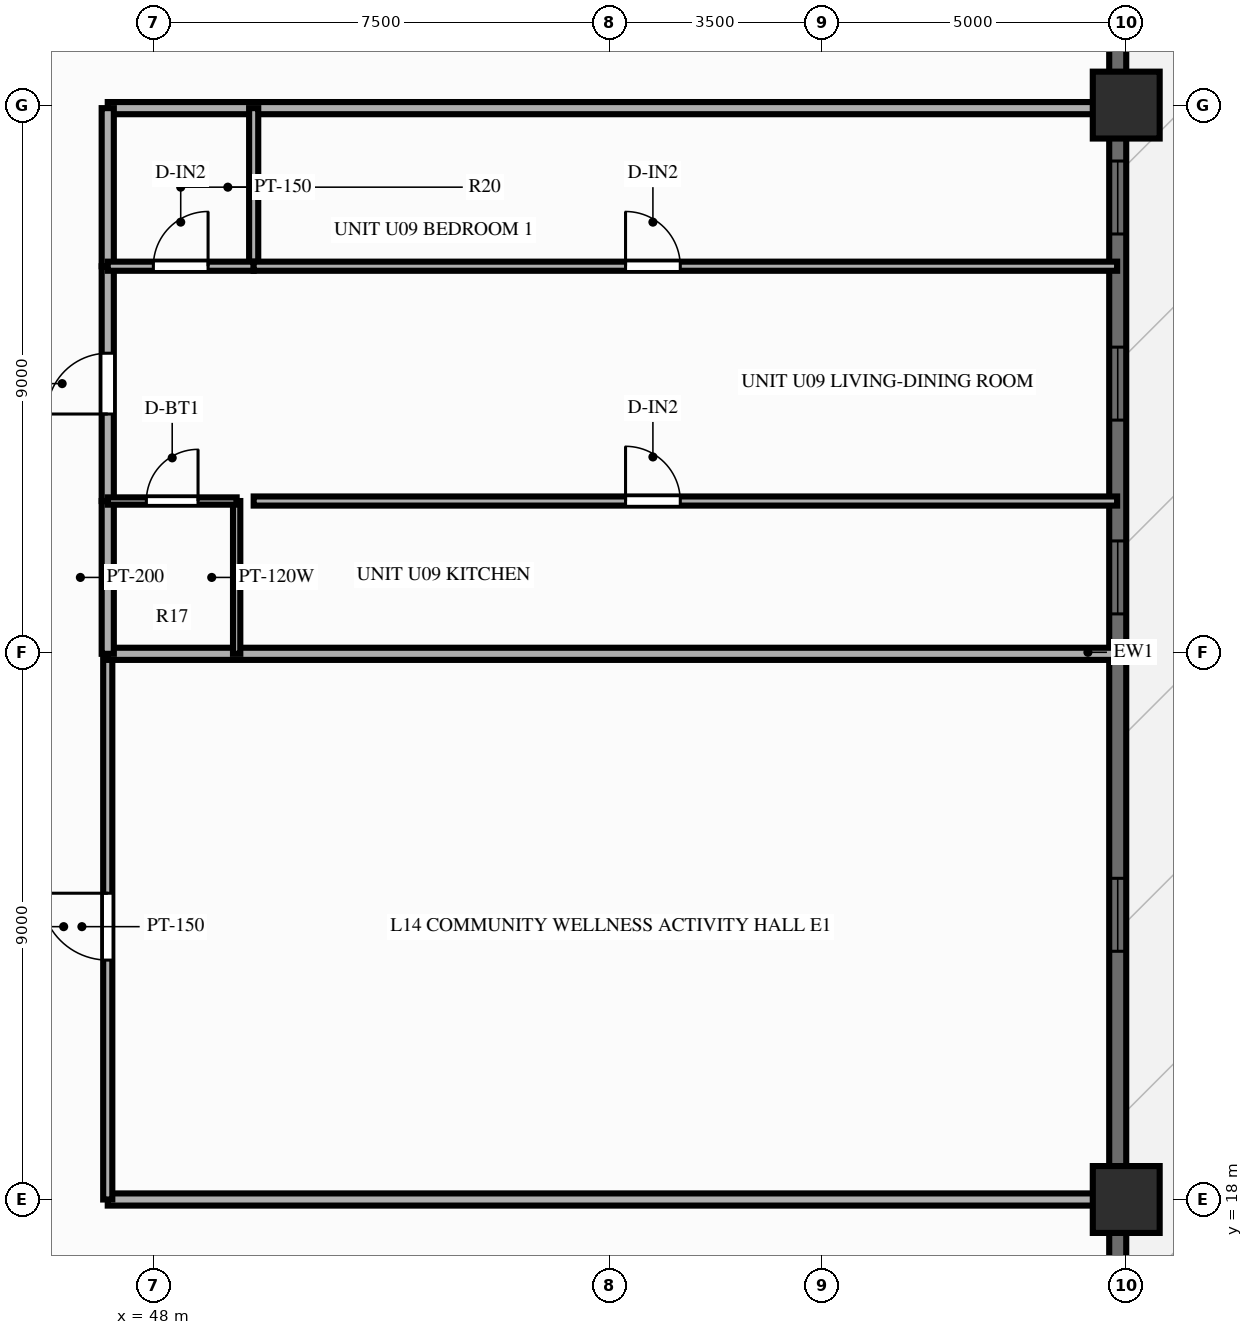
"""IFC4 building model, lengths in metres.
Left out: names, types, materials, properties, quantities, classifications, styles, units other than length and angle.
Written with IfcOpenShell. Run it as: python <this file> out.ifc"""

import sys

from ifc_helpers import new_model, si_unit, direction, frame, frame_2d, origin, origin_2d, place, context, subcontext, project, spatial, rectangle, extrude, source, transform, mapped, element, fill, save


model = new_model("IFC4")
c1 = context("Model", 3, precision=1e-05, world=origin(), true_north=direction((0.0, 1.0)))
c2 = subcontext(c1, "Body", "Model", "MODEL_VIEW")
j1 = project(units=[si_unit("LENGTHUNIT", "METRE"), si_unit("PLANEANGLEUNIT", "RADIAN")], contexts=[c1])
p1 = place(None, origin())
s1 = spatial("IfcSite", under=j1, at=p1, CompositionType="ELEMENT")
p2 = place(p1, origin())
s2 = spatial("IfcBuilding", under=s1, at=p2, CompositionType="ELEMENT")
p3 = place(p2, frame((0.0, 0.0, 46.4)))
s3 = spatial("IfcBuildingStorey", under=s2, at=p3, CompositionType="ELEMENT", Elevation=46.4)
m1 = source(origin(), c2, "Body", "SweptSolid", [
    extrude(rectangle(XDim=1.1, YDim=1.1, at=origin_2d()), origin(), (0.0, 0.0, 1.0), 3.0),
])
for number, where, z_axis, x_axis in (
    (1, (64.0, 18.0, 0.0), (0.0, 0.0, 1.0), (1.0, 0.0, 0.0)),
    (2, (64.0, 36.0, 0.0), (0.0, 0.0, 1.0), (1.0, 0.0, 0.0)),
):
    element("IfcColumn", number, at=place(p3, frame(where, z_axis=z_axis, x_axis=x_axis)), inside=s3, PredefinedType="COLUMN", context=c2, shape_type="MappedRepresentation", body=[
        mapped(m1, transform((0.0, 0.0, 0.0), scale=1.0)),
    ])
p4 = place(p3, frame((63.86, 6.5, 0.0), z_axis=(0.0, 0.0, 1.0), x_axis=(0.0, 1.0, 0.0)))
e3 = element("IfcWall", 3, at=p4, inside=s3, PredefinedType="SOLIDWALL", context=c2, shape_type="SweptSolid", body=[
    extrude(rectangle(XDim=41.0, YDim=0.28, at=frame_2d((20.5, 0.0))), origin(), (0.0, 0.0, 1.0), 2.28),
])
p5 = place(p4, frame((5.15, 0.0, 0.25)))
e4 = element("IfcOpeningElement", 4, at=p5, cuts=e3, PredefinedType="OPENING", context=c2, shape_type="SweptSolid", body=[
    extrude(rectangle(XDim=1.2, YDim=1.5, at=frame_2d((0.6, 0.75))), frame((0.0, 0.152, 0.0), z_axis=(0.0, -1.0, 0.0), x_axis=(1.0, 0.0, 0.0)), (0.0, 0.0, 1.0), 0.304),
])
p6 = place(p4, frame((15.583, 0.0, 0.25)))
e5 = element("IfcOpeningElement", 5, at=p6, cuts=e3, PredefinedType="OPENING", context=c2, shape_type="SweptSolid", body=[
    extrude(rectangle(XDim=1.2, YDim=1.5, at=frame_2d((0.6, 0.75))), frame((0.0, 0.152, 0.0), z_axis=(0.0, -1.0, 0.0), x_axis=(1.0, 0.0, 0.0)), (0.0, 0.0, 1.0), 0.304),
])
p7 = place(p4, frame((21.132, 0.0, 0.25)))
e6 = element("IfcOpeningElement", 6, at=p7, cuts=e3, PredefinedType="OPENING", context=c2, shape_type="SweptSolid", body=[
    extrude(rectangle(XDim=1.2, YDim=1.5, at=frame_2d((0.6, 0.75))), frame((0.0, 0.152, 0.0), z_axis=(0.0, -1.0, 0.0), x_axis=(1.0, 0.0, 0.0)), (0.0, 0.0, 1.0), 0.304),
])
p8 = place(p4, frame((24.319, 0.0, 0.25)))
e7 = element("IfcOpeningElement", 7, at=p8, cuts=e3, PredefinedType="OPENING", context=c2, shape_type="SweptSolid", body=[
    extrude(rectangle(XDim=1.2, YDim=1.5, at=frame_2d((0.6, 0.75))), frame((0.0, 0.152, 0.0), z_axis=(0.0, -1.0, 0.0), x_axis=(1.0, 0.0, 0.0)), (0.0, 0.0, 1.0), 0.304),
])
p9 = place(p4, frame((27.38, 0.0, 0.25)))
e8 = element("IfcOpeningElement", 8, at=p9, cuts=e3, PredefinedType="OPENING", context=c2, shape_type="SweptSolid", body=[
    extrude(rectangle(XDim=1.2, YDim=1.5, at=frame_2d((0.6, 0.75))), frame((0.0, 0.152, 0.0), z_axis=(0.0, -1.0, 0.0), x_axis=(1.0, 0.0, 0.0)), (0.0, 0.0, 1.0), 0.304),
])
p10 = place(p4, frame((36.05, 0.0, 0.0), z_axis=(0.0, 0.0, 1.0), x_axis=(-1.0, 0.0, 0.0)))
e9 = element("IfcOpeningElement", 9, at=p10, cuts=e3, PredefinedType="OPENING", context=c2, shape_type="SweptSolid", body=[
    extrude(rectangle(XDim=1.6, YDim=2.15, at=frame_2d((0.8, 1.075))), frame((0.0, 0.152, 0.0), z_axis=(0.0, -1.0, 0.0), x_axis=(1.0, 0.0, 0.0)), (0.0, 0.0, 1.0), 0.304),
])
for number, where, z_axis, x_axis in (
    (10, (47.25, 18.0, 0.0), (0.0, 0.0, 1.0), (1.0, 0.0, 0.0)),
    (11, (47.25, 35.95, 0.0), (0.0, 0.0, 1.0), (1.0, 0.0, 0.0)),
):
    element("IfcWall", number, at=place(p3, frame(where, z_axis=z_axis, x_axis=x_axis)), inside=s3, PredefinedType="PARTITIONING", context=c2, shape_type="SweptSolid", body=[
        extrude(rectangle(XDim=16.6, YDim=0.2, at=frame_2d((8.3, 0.0))), origin(), (0.0, 0.0, 1.0), 2.24),
    ])
p11 = place(p3, frame((47.25, 18.0, 0.0), z_axis=(0.0, 0.0, 1.0), x_axis=(0.0, 1.0, 0.0)))
e12 = element("IfcWall", 12, at=p11, inside=s3, PredefinedType="PARTITIONING", context=c2, shape_type="SweptSolid", body=[
    extrude(rectangle(XDim=8.975, YDim=0.15, at=frame_2d((4.488, 0.0))), origin(), (0.0, 0.0, 1.0), 2.79),
])
p12 = place(p11, frame((3.938, 0.0, 0.0)))
e13 = element("IfcOpeningElement", 13, at=p12, cuts=e12, PredefinedType="OPENING", context=c2, shape_type="SweptSolid", body=[
    extrude(rectangle(XDim=1.1, YDim=2.15, at=frame_2d((0.55, 1.075))), frame((0.0, 0.087, 0.0), z_axis=(0.0, -1.0, 0.0), x_axis=(1.0, 0.0, 0.0)), (0.0, 0.0, 1.0), 0.174),
])
p13 = place(p3, frame((47.25, 26.975, 0.0), z_axis=(0.0, 0.0, 1.0), x_axis=(1.0, 0.0, 0.0)))
e14 = element("IfcWall", 14, at=p13, inside=s3, PredefinedType="PARTITIONING", context=c2, shape_type="SweptSolid", body=[
    extrude(rectangle(XDim=16.6, YDim=0.2, at=frame_2d((8.3, 0.0))), origin(), (0.0, 0.0, 1.0), 2.79),
])
p14 = place(p3, frame((47.25, 26.975, 0.0), z_axis=(0.0, 0.0, 1.0), x_axis=(0.0, 1.0, 0.0)))
e15 = element("IfcWall", 15, at=p14, inside=s3, PredefinedType="PARTITIONING", context=c2, shape_type="SweptSolid", body=[
    extrude(rectangle(XDim=2.513, YDim=0.2, at=frame_2d((1.256, 0.0))), origin(), (0.0, 0.0, 1.0), 2.79),
])
p15 = place(p3, frame((47.25, 29.488, 0.0), z_axis=(0.0, 0.0, 1.0), x_axis=(0.0, 1.0, 0.0)))
e16 = element("IfcWall", 16, at=p15, inside=s3, PredefinedType="PARTITIONING", context=c2, shape_type="SweptSolid", body=[
    extrude(rectangle(XDim=3.862, YDim=0.2, at=frame_2d((1.931, 0.0))), origin(), (0.0, 0.0, 1.0), 2.79),
])
p16 = place(p15, frame((1.431, 0.0, 0.0)))
e17 = element("IfcOpeningElement", 17, at=p16, cuts=e16, PredefinedType="OPENING", context=c2, shape_type="SweptSolid", body=[
    extrude(rectangle(XDim=1.0, YDim=2.15, at=frame_2d((0.5, 1.075))), frame((0.0, 0.112, 0.0), z_axis=(0.0, -1.0, 0.0), x_axis=(1.0, 0.0, 0.0)), (0.0, 0.0, 1.0), 0.224),
])
p17 = place(p3, frame((47.25, 33.35, 0.0), z_axis=(0.0, 0.0, 1.0), x_axis=(0.0, 1.0, 0.0)))
e18 = element("IfcWall", 18, at=p17, inside=s3, PredefinedType="PARTITIONING", context=c2, shape_type="SweptSolid", body=[
    extrude(rectangle(XDim=2.6, YDim=0.2, at=frame_2d((1.3, 0.0))), origin(), (0.0, 0.0, 1.0), 2.79),
])
p18 = place(p3, frame((49.37, 26.975, 0.0), z_axis=(0.0, 0.0, 1.0), x_axis=(0.0, 1.0, 0.0)))
e19 = element("IfcWall", 19, at=p18, inside=s3, PredefinedType="PARTITIONING", context=c2, shape_type="SweptSolid", body=[
    extrude(rectangle(XDim=2.513, YDim=0.12, at=frame_2d((1.256, 0.0))), origin(), (0.0, 0.0, 1.0), 2.79),
])
p19 = place(p3, frame((49.65, 33.35, 0.0), z_axis=(0.0, 0.0, 1.0), x_axis=(0.0, 1.0, 0.0)))
e20 = element("IfcWall", 20, at=p19, inside=s3, PredefinedType="PARTITIONING", context=c2, shape_type="SweptSolid", body=[
    extrude(rectangle(XDim=2.6, YDim=0.15, at=frame_2d((1.3, 0.0))), origin(), (0.0, 0.0, 1.0), 2.79),
])
p20 = place(p3, frame((47.25, 29.488, 0.0), z_axis=(0.0, 0.0, 1.0), x_axis=(1.0, 0.0, 0.0)))
e21 = element("IfcWall", 21, at=p20, inside=s3, PredefinedType="PARTITIONING", context=c2, shape_type="SweptSolid", body=[
    extrude(rectangle(XDim=2.12, YDim=0.12, at=frame_2d((1.06, 0.0))), origin(), (0.0, 0.0, 1.0), 2.79),
])
p21 = place(p20, frame((0.635, 0.0, 0.0)))
e22 = element("IfcOpeningElement", 22, at=p21, cuts=e21, PredefinedType="OPENING", context=c2, shape_type="SweptSolid", body=[
    extrude(rectangle(XDim=0.85, YDim=2.05, at=frame_2d((0.425, 1.025))), frame((0.0, 0.072, 0.0), z_axis=(0.0, -1.0, 0.0), x_axis=(1.0, 0.0, 0.0)), (0.0, 0.0, 1.0), 0.144),
])
p22 = place(p3, frame((49.65, 29.488, 0.0), z_axis=(0.0, 0.0, 1.0), x_axis=(1.0, 0.0, 0.0)))
e23 = element("IfcWall", 23, at=p22, inside=s3, PredefinedType="PARTITIONING", context=c2, shape_type="SweptSolid", body=[
    extrude(rectangle(XDim=14.2, YDim=0.15, at=frame_2d((7.1, 0.0))), origin(), (0.0, 0.0, 1.0), 2.79),
])
p23 = place(p22, frame((6.116, 0.0, 0.0)))
e24 = element("IfcOpeningElement", 24, at=p23, cuts=e23, PredefinedType="OPENING", context=c2, shape_type="SweptSolid", body=[
    extrude(rectangle(XDim=0.9, YDim=2.1, at=frame_2d((0.45, 1.05))), frame((0.0, 0.087, 0.0), z_axis=(0.0, -1.0, 0.0), x_axis=(1.0, 0.0, 0.0)), (0.0, 0.0, 1.0), 0.174),
])
p24 = place(p3, frame((47.25, 33.35, 0.0), z_axis=(0.0, 0.0, 1.0), x_axis=(1.0, 0.0, 0.0)))
e25 = element("IfcWall", 25, at=p24, inside=s3, PredefinedType="PARTITIONING", context=c2, shape_type="SweptSolid", body=[
    extrude(rectangle(XDim=2.4, YDim=0.15, at=frame_2d((1.2, 0.0))), origin(), (0.0, 0.0, 1.0), 2.79),
])
p25 = place(p24, frame((0.75, 0.0, 0.0)))
e26 = element("IfcOpeningElement", 26, at=p25, cuts=e25, PredefinedType="OPENING", context=c2, shape_type="SweptSolid", body=[
    extrude(rectangle(XDim=0.9, YDim=2.1, at=frame_2d((0.45, 1.05))), frame((0.0, 0.087, 0.0), z_axis=(0.0, -1.0, 0.0), x_axis=(1.0, 0.0, 0.0)), (0.0, 0.0, 1.0), 0.174),
])
p26 = place(p3, frame((49.65, 33.35, 0.0), z_axis=(0.0, 0.0, 1.0), x_axis=(1.0, 0.0, 0.0)))
e27 = element("IfcWall", 27, at=p26, inside=s3, PredefinedType="PARTITIONING", context=c2, shape_type="SweptSolid", body=[
    extrude(rectangle(XDim=14.2, YDim=0.15, at=frame_2d((7.1, 0.0))), origin(), (0.0, 0.0, 1.0), 2.79),
])
p27 = place(p26, frame((6.116, 0.0, 0.0)))
e28 = element("IfcOpeningElement", 28, at=p27, cuts=e27, PredefinedType="OPENING", context=c2, shape_type="SweptSolid", body=[
    extrude(rectangle(XDim=0.9, YDim=2.1, at=frame_2d((0.45, 1.05))), frame((0.0, 0.087, 0.0), z_axis=(0.0, -1.0, 0.0), x_axis=(1.0, 0.0, 0.0)), (0.0, 0.0, 1.0), 0.174),
])
m2 = source(origin(), c2, "Body", "SweptSolid", [
    extrude(rectangle(XDim=1.2, YDim=1.5, at=frame_2d((0.6, 0.75))), frame((0.0, 0.03, 0.0), z_axis=(0.0, -1.0, 0.0), x_axis=(1.0, 0.0, 0.0)), (0.0, 0.0, 1.0), 0.06),
])
p28 = place(p6, origin())
e29 = element("IfcWindow", 29, at=p28, inside=s3, PartitioningType="SINGLE_PANEL", PredefinedType="WINDOW", context=c2, shape_type="MappedRepresentation", body=[
    mapped(m2, transform((0.0, 0.0, 0.0), scale=1.0)),
])
fill(e5, e29)
p29 = place(p7, origin())
e30 = element("IfcWindow", 30, at=p29, inside=s3, PartitioningType="SINGLE_PANEL", PredefinedType="WINDOW", context=c2, shape_type="MappedRepresentation", body=[
    mapped(m2, transform((0.0, 0.0, 0.0), scale=1.0)),
])
fill(e6, e30)
p30 = place(p8, origin())
e31 = element("IfcWindow", 31, at=p30, inside=s3, PartitioningType="SINGLE_PANEL", PredefinedType="WINDOW", context=c2, shape_type="MappedRepresentation", body=[
    mapped(m2, transform((0.0, 0.0, 0.0), scale=1.0)),
])
fill(e7, e31)
p31 = place(p9, origin())
e32 = element("IfcWindow", 32, at=p31, inside=s3, PartitioningType="SINGLE_PANEL", PredefinedType="WINDOW", context=c2, shape_type="MappedRepresentation", body=[
    mapped(m2, transform((0.0, 0.0, 0.0), scale=1.0)),
])
fill(e8, e32)
m3 = source(origin(), c2, "Body", "SweptSolid", [
    extrude(rectangle(XDim=1.1, YDim=2.15, at=frame_2d((0.55, 1.075))), frame((0.0, 0.025, 0.0), z_axis=(0.0, -1.0, 0.0), x_axis=(1.0, 0.0, 0.0)), (0.0, 0.0, 1.0), 0.05),
])
p32 = place(p12, origin())
e33 = element("IfcDoor", 33, at=p32, inside=s3, OperationType="SINGLE_SWING_RIGHT", PredefinedType="DOOR", context=c2, shape_type="MappedRepresentation", body=[
    mapped(m3, transform((0.0, 0.0, 0.0), scale=1.0)),
])
fill(e13, e33)
m4 = source(origin(), c2, "Body", "SweptSolid", [
    extrude(rectangle(XDim=1.0, YDim=2.15, at=frame_2d((0.5, 1.075))), frame((0.0, 0.025, 0.0), z_axis=(0.0, -1.0, 0.0), x_axis=(1.0, 0.0, 0.0)), (0.0, 0.0, 1.0), 0.05),
])
p33 = place(p16, origin())
e34 = element("IfcDoor", 34, at=p33, inside=s3, OperationType="SINGLE_SWING_LEFT", PredefinedType="DOOR", context=c2, shape_type="MappedRepresentation", body=[
    mapped(m4, transform((0.0, 0.0, 0.0), scale=1.0)),
])
fill(e17, e34)
m5 = source(origin(), c2, "Body", "SweptSolid", [
    extrude(rectangle(XDim=0.85, YDim=2.05, at=frame_2d((0.425, 1.025))), frame((0.0, 0.025, 0.0), z_axis=(0.0, -1.0, 0.0), x_axis=(1.0, 0.0, 0.0)), (0.0, 0.0, 1.0), 0.05),
])
p34 = place(p21, origin())
e35 = element("IfcDoor", 35, at=p34, inside=s3, OperationType="SINGLE_SWING_RIGHT", PredefinedType="DOOR", context=c2, shape_type="MappedRepresentation", body=[
    mapped(m5, transform((0.0, 0.0, 0.0), scale=1.0)),
])
fill(e22, e35)
m6 = source(origin(), c2, "Body", "SweptSolid", [
    extrude(rectangle(XDim=0.9, YDim=2.1, at=frame_2d((0.45, 1.05))), frame((0.0, 0.025, 0.0), z_axis=(0.0, -1.0, 0.0), x_axis=(1.0, 0.0, 0.0)), (0.0, 0.0, 1.0), 0.05),
])
p35 = place(p23, origin())
e36 = element("IfcDoor", 36, at=p35, inside=s3, OperationType="SINGLE_SWING_LEFT", PredefinedType="DOOR", context=c2, shape_type="MappedRepresentation", body=[
    mapped(m6, transform((0.0, 0.0, 0.0), scale=1.0)),
])
fill(e24, e36)
p36 = place(p25, origin())
e37 = element("IfcDoor", 37, at=p36, inside=s3, OperationType="SINGLE_SWING_RIGHT", PredefinedType="DOOR", context=c2, shape_type="MappedRepresentation", body=[
    mapped(m6, transform((0.0, 0.0, 0.0), scale=1.0)),
])
fill(e26, e37)
p37 = place(p27, origin())
e38 = element("IfcDoor", 38, at=p37, inside=s3, OperationType="SINGLE_SWING_LEFT", PredefinedType="DOOR", context=c2, shape_type="MappedRepresentation", body=[
    mapped(m6, transform((0.0, 0.0, 0.0), scale=1.0)),
])
fill(e28, e38)
save(model, sys.argv[1])
